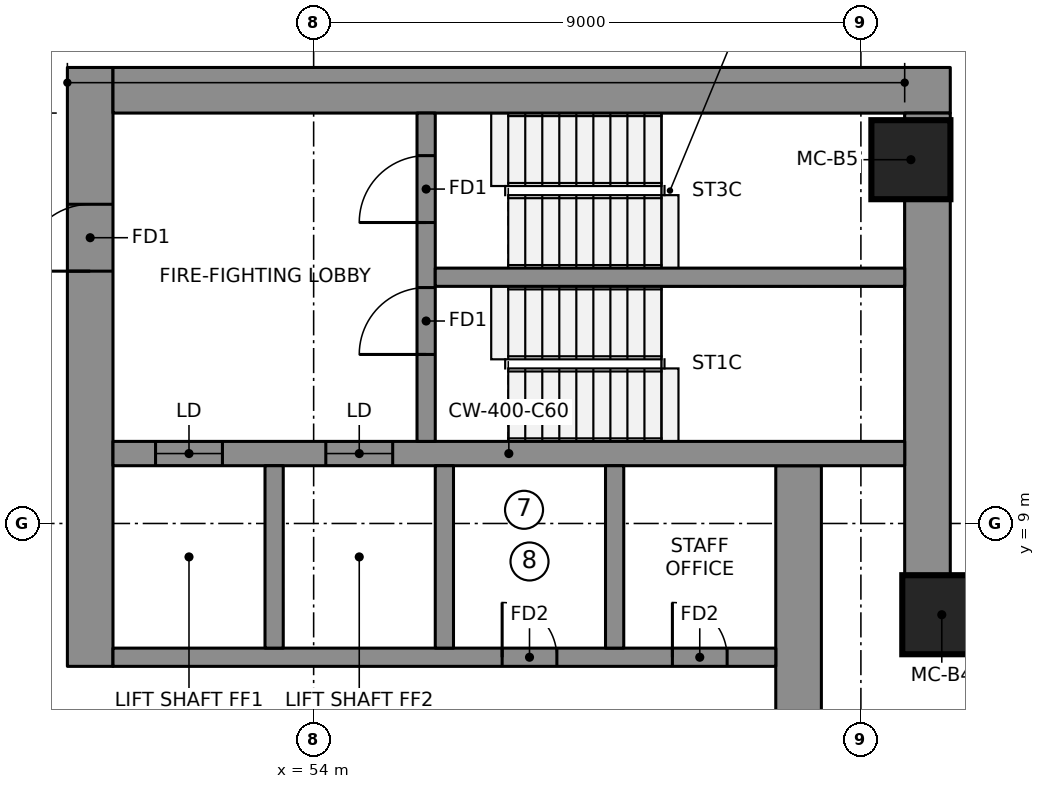
"""IFC4 building model, lengths in metres.
Left out: names, types, materials, properties, quantities, classifications, styles, units other than length and angle.
Written with IfcOpenShell. Run it as: python <this file> out.ifc"""

import sys

from ifc_helpers import new_model, si_unit, direction, frame, frame_2d, origin, origin_2d, place, context, subcontext, project, spatial, rectangle, extrude, element, fill, save


model = new_model("IFC4")
c1 = context("Model", 3, precision=1e-05, world=origin(), true_north=direction((0.0, 1.0)))
c2 = subcontext(c1, "Body", "Model", "MODEL_VIEW")
j1 = project(units=[si_unit("LENGTHUNIT", "METRE"), si_unit("PLANEANGLEUNIT", "RADIAN")], contexts=[c1])
p1 = place(None, origin())
s1 = spatial("IfcSite", under=j1, at=p1, CompositionType="ELEMENT")
p2 = place(p1, origin())
s2 = spatial("IfcBuilding", under=s1, at=p2, CompositionType="ELEMENT")
p3 = place(p2, frame((0.0, 0.0, 200.35)))
s3 = spatial("IfcBuildingStorey", under=s2, at=p3, CompositionType="ELEMENT", Elevation=200.35)
p4 = place(p3, frame((50.325, 6.65, 0.0), z_axis=(0.0, 0.0, 1.0), x_axis=(0.0, 1.0, 0.0)))
e1 = element("IfcWall", 1, at=p4, inside=s3, PredefinedType="SHEAR", context=c2, shape_type="SweptSolid", body=[
    extrude(rectangle(XDim=9.85, YDim=0.75, at=frame_2d((4.925, 0.0))), origin(), (0.0, 0.0, 1.0), 3.55),
])
p5 = place(p4, frame((6.5, 0.0, 0.0)))
e2 = element("IfcOpeningElement", 2, at=p5, cuts=e1, PredefinedType="OPENING", context=c2, shape_type="SweptSolid", body=[
    extrude(rectangle(XDim=1.1, YDim=2.1, at=frame_2d((0.55, 1.05))), frame((0.0, 0.385, 0.0), z_axis=(0.0, -1.0, 0.0), x_axis=(1.0, 0.0, 0.0)), (0.0, 0.0, 1.0), 0.77),
])
p6 = place(p3, frame((50.7, 16.125, 0.0), z_axis=(0.0, 0.0, 1.0), x_axis=(1.0, 0.0, 0.0)))
e3 = element("IfcWall", 3, at=p6, inside=s3, PredefinedType="SHEAR", context=c2, shape_type="SweptSolid", body=[
    extrude(rectangle(XDim=13.77, YDim=0.75, at=frame_2d((6.885, 0.0))), origin(), (0.0, 0.0, 1.0), 3.55),
])
p7 = place(p3, frame((64.095, 8.099, 0.0), z_axis=(0.0, 0.0, 1.0), x_axis=(0.0, 1.0, 0.0)))
e4 = element("IfcWall", 4, at=p7, inside=s3, PredefinedType="SHEAR", context=c2, shape_type="SweptSolid", body=[
    extrude(rectangle(XDim=7.651, YDim=0.75, at=frame_2d((3.825, 0.0))), origin(), (0.0, 0.0, 1.0), 3.55),
])
p8 = place(p3, frame((61.975, -9.95, 0.0), z_axis=(0.0, 0.0, 1.0), x_axis=(0.0, 1.0, 0.0)))
e5 = element("IfcWall", 5, at=p8, inside=s3, PredefinedType="SHEAR", context=c2, shape_type="SweptSolid", body=[
    extrude(rectangle(XDim=19.9, YDim=0.75, at=frame_2d((9.95, 0.0))), origin(), (0.0, 0.0, 1.0), 3.55),
])
p9 = place(p3, frame((50.7, 10.15, 0.0), z_axis=(0.0, 0.0, 1.0), x_axis=(1.0, 0.0, 0.0)))
e6 = element("IfcWall", 6, at=p9, inside=s3, PredefinedType="SHEAR", context=c2, shape_type="SweptSolid", body=[
    extrude(rectangle(XDim=13.02, YDim=0.4, at=frame_2d((6.51, 0.0))), origin(), (0.0, 0.0, 1.0), 3.55),
])
p10 = place(p9, frame((0.7, 0.0, 0.0)))
e7 = element("IfcOpeningElement", 7, at=p10, cuts=e6, PredefinedType="OPENING", context=c2, shape_type="SweptSolid", body=[
    extrude(rectangle(XDim=1.1, YDim=2.1, at=frame_2d((0.55, 1.05))), frame((0.0, 0.21, 0.0), z_axis=(0.0, -1.0, 0.0), x_axis=(1.0, 0.0, 0.0)), (0.0, 0.0, 1.0), 0.42),
])
p11 = place(p9, frame((3.5, 0.0, 0.0)))
e8 = element("IfcOpeningElement", 8, at=p11, cuts=e6, PredefinedType="OPENING", context=c2, shape_type="SweptSolid", body=[
    extrude(rectangle(XDim=1.1, YDim=2.1, at=frame_2d((0.55, 1.05))), frame((0.0, 0.21, 0.0), z_axis=(0.0, -1.0, 0.0), x_axis=(1.0, 0.0, 0.0)), (0.0, 0.0, 1.0), 0.42),
])
p12 = place(p3, frame((50.7, 6.8, 0.0), z_axis=(0.0, 0.0, 1.0), x_axis=(1.0, 0.0, 0.0)))
e9 = element("IfcWall", 9, at=p12, inside=s3, PredefinedType="SHEAR", context=c2, shape_type="SweptSolid", body=[
    extrude(rectangle(XDim=10.9, YDim=0.3, at=frame_2d((5.45, 0.0))), origin(), (0.0, 0.0, 1.0), 3.55),
])
p13 = place(p12, frame((6.4, 0.0, 0.0)))
e10 = element("IfcOpeningElement", 10, at=p13, cuts=e9, PredefinedType="OPENING", context=c2, shape_type="SweptSolid", body=[
    extrude(rectangle(XDim=0.9, YDim=2.1, at=frame_2d((0.45, 1.05))), frame((0.0, 0.16, 0.0), z_axis=(0.0, -1.0, 0.0), x_axis=(1.0, 0.0, 0.0)), (0.0, 0.0, 1.0), 0.32),
])
p14 = place(p12, frame((9.2, 0.0, 0.0)))
e11 = element("IfcOpeningElement", 11, at=p14, cuts=e9, PredefinedType="OPENING", context=c2, shape_type="SweptSolid", body=[
    extrude(rectangle(XDim=0.9, YDim=2.1, at=frame_2d((0.45, 1.05))), frame((0.0, 0.16, 0.0), z_axis=(0.0, -1.0, 0.0), x_axis=(1.0, 0.0, 0.0)), (0.0, 0.0, 1.0), 0.32),
])
for number, where, z_axis, x_axis in (
    (12, (53.35, 6.95, 0.0), (0.0, 0.0, 1.0), (0.0, 1.0, 0.0)),
    (13, (56.15, 6.95, 0.0), (0.0, 0.0, 1.0), (0.0, 1.0, 0.0)),
    (14, (58.95, 6.95, 0.0), (0.0, 0.0, 1.0), (0.0, 1.0, 0.0)),
):
    element("IfcWall", number, at=place(p3, frame(where, z_axis=z_axis, x_axis=x_axis)), inside=s3, PredefinedType="SHEAR", context=c2, shape_type="SweptSolid", body=[
        extrude(rectangle(XDim=3.0, YDim=0.3, at=frame_2d((1.5, 0.0))), origin(), (0.0, 0.0, 1.0), 3.55),
    ])
p15 = place(p3, frame((55.85, 10.35, 0.0), z_axis=(0.0, 0.0, 1.0), x_axis=(0.0, 1.0, 0.0)))
e15 = element("IfcWall", 15, at=p15, inside=s3, PredefinedType="SHEAR", context=c2, shape_type="SweptSolid", body=[
    extrude(rectangle(XDim=5.4, YDim=0.3, at=frame_2d((2.7, 0.0))), origin(), (0.0, 0.0, 1.0), 3.55),
])
p16 = place(p15, frame((1.43, 0.0, 0.0)))
e16 = element("IfcOpeningElement", 16, at=p16, cuts=e15, PredefinedType="OPENING", context=c2, shape_type="SweptSolid", body=[
    extrude(rectangle(XDim=1.1, YDim=2.1, at=frame_2d((0.55, 1.05))), frame((0.0, 0.16, 0.0), z_axis=(0.0, -1.0, 0.0), x_axis=(1.0, 0.0, 0.0)), (0.0, 0.0, 1.0), 0.32),
])
p17 = place(p15, frame((3.6, 0.0, 0.0)))
e17 = element("IfcOpeningElement", 17, at=p17, cuts=e15, PredefinedType="OPENING", context=c2, shape_type="SweptSolid", body=[
    extrude(rectangle(XDim=1.1, YDim=2.1, at=frame_2d((0.55, 1.05))), frame((0.0, 0.16, 0.0), z_axis=(0.0, -1.0, 0.0), x_axis=(1.0, 0.0, 0.0)), (0.0, 0.0, 1.0), 0.32),
])
p18 = place(p3, frame((56.0, 13.05, 0.0), z_axis=(0.0, 0.0, 1.0), x_axis=(1.0, 0.0, 0.0)))
e18 = element("IfcWall", 18, at=p18, inside=s3, PredefinedType="SHEAR", context=c2, shape_type="SweptSolid", body=[
    extrude(rectangle(XDim=7.72, YDim=0.3, at=frame_2d((3.86, 0.0))), origin(), (0.0, 0.0, 1.0), 3.55),
])
for number, where, z_axis, x_axis in (
    (19, (64.33, 7.499, 0.0), (0.0, 0.0, 1.0), (1.0, 0.0, 0.0)),
    (20, (63.822, 14.983, 0.0), (0.0, 0.0, 1.0), (1.0, 0.0, 0.0)),
):
    element("IfcColumn", number, at=place(p3, frame(where, z_axis=z_axis, x_axis=x_axis)), inside=s3, PredefinedType="COLUMN", context=c2, shape_type="SweptSolid", body=[
        extrude(rectangle(XDim=1.3, YDim=1.3, at=origin_2d()), origin(), (0.0, 0.0, 1.0), 3.55),
    ])
p19 = place(p10, origin())
e21 = element("IfcDoor", 21, at=p19, inside=s3, OperationType="DOUBLE_DOOR_SLIDING", PredefinedType="DOOR", context=c2, shape_type="SweptSolid", body=[
    extrude(rectangle(XDim=1.1, YDim=2.1, at=frame_2d((0.55, 1.05))), frame((0.0, 0.025, 0.0), z_axis=(0.0, -1.0, 0.0), x_axis=(1.0, 0.0, 0.0)), (0.0, 0.0, 1.0), 0.05),
])
fill(e7, e21)
p20 = place(p11, origin())
e22 = element("IfcDoor", 22, at=p20, inside=s3, OperationType="DOUBLE_DOOR_SLIDING", PredefinedType="DOOR", context=c2, shape_type="SweptSolid", body=[
    extrude(rectangle(XDim=1.1, YDim=2.1, at=frame_2d((0.55, 1.05))), frame((0.0, 0.025, 0.0), z_axis=(0.0, -1.0, 0.0), x_axis=(1.0, 0.0, 0.0)), (0.0, 0.0, 1.0), 0.05),
])
fill(e8, e22)
p21 = place(p16, origin())
e23 = element("IfcDoor", 23, at=p21, inside=s3, OperationType="SINGLE_SWING_RIGHT", PredefinedType="DOOR", context=c2, shape_type="SweptSolid", body=[
    extrude(rectangle(XDim=1.1, YDim=2.1, at=frame_2d((0.55, 1.05))), frame((0.0, 0.025, 0.0), z_axis=(0.0, -1.0, 0.0), x_axis=(1.0, 0.0, 0.0)), (0.0, 0.0, 1.0), 0.05),
])
fill(e16, e23)
p22 = place(p17, origin())
e24 = element("IfcDoor", 24, at=p22, inside=s3, OperationType="SINGLE_SWING_RIGHT", PredefinedType="DOOR", context=c2, shape_type="SweptSolid", body=[
    extrude(rectangle(XDim=1.1, YDim=2.1, at=frame_2d((0.55, 1.05))), frame((0.0, 0.025, 0.0), z_axis=(0.0, -1.0, 0.0), x_axis=(1.0, 0.0, 0.0)), (0.0, 0.0, 1.0), 0.05),
])
fill(e17, e24)
p23 = place(p5, origin())
e25 = element("IfcDoor", 25, at=p23, inside=s3, OperationType="SINGLE_SWING_RIGHT", PredefinedType="DOOR", context=c2, shape_type="SweptSolid", body=[
    extrude(rectangle(XDim=1.1, YDim=2.1, at=frame_2d((0.55, 1.05))), frame((0.0, 0.025, 0.0), z_axis=(0.0, -1.0, 0.0), x_axis=(1.0, 0.0, 0.0)), (0.0, 0.0, 1.0), 0.05),
])
fill(e2, e25)
p24 = place(p13, origin())
e26 = element("IfcDoor", 26, at=p24, inside=s3, OperationType="SINGLE_SWING_LEFT", PredefinedType="DOOR", context=c2, shape_type="SweptSolid", body=[
    extrude(rectangle(XDim=0.9, YDim=2.1, at=frame_2d((0.45, 1.05))), frame((0.0, 0.025, 0.0), z_axis=(0.0, -1.0, 0.0), x_axis=(1.0, 0.0, 0.0)), (0.0, 0.0, 1.0), 0.05),
])
fill(e10, e26)
p25 = place(p14, origin())
e27 = element("IfcDoor", 27, at=p25, inside=s3, OperationType="SINGLE_SWING_LEFT", PredefinedType="DOOR", context=c2, shape_type="SweptSolid", body=[
    extrude(rectangle(XDim=0.9, YDim=2.1, at=frame_2d((0.45, 1.05))), frame((0.0, 0.025, 0.0), z_axis=(0.0, -1.0, 0.0), x_axis=(1.0, 0.0, 0.0)), (0.0, 0.0, 1.0), 0.05),
])
fill(e11, e27)
save(model, sys.argv[1])
